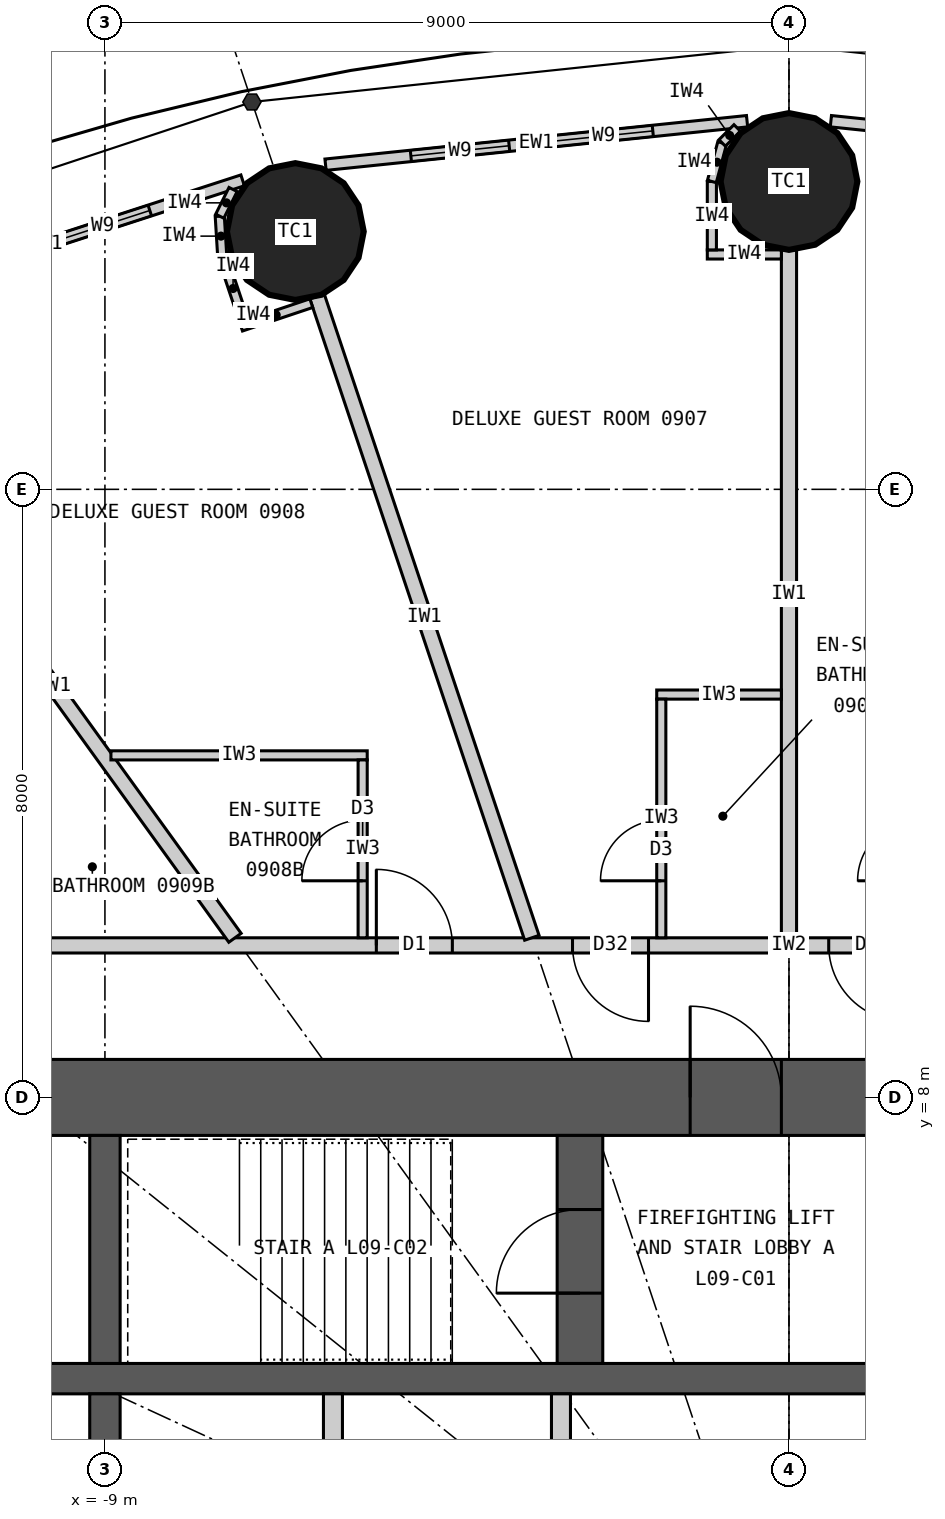
"""IFC4 building model, lengths in metres.
Left out: names, types, materials, properties, quantities, classifications, styles, units other than length and angle.
Written with IfcOpenShell. Run it as: python <this file> out.ifc"""

import sys

from ifc_helpers import new_model, si_unit, direction, frame, frame_2d, origin, origin_2d, place, context, subcontext, project, spatial, rectangle, circle, extrude, element, fill, save


model = new_model("IFC4")
c1 = context("Model", 3, precision=1e-05, world=origin(), true_north=direction((0.0, 1.0)))
c2 = subcontext(c1, "Body", "Model", "MODEL_VIEW")
j1 = project(units=[si_unit("LENGTHUNIT", "METRE"), si_unit("PLANEANGLEUNIT", "RADIAN")], contexts=[c1])
p1 = place(None, origin())
s1 = spatial("IfcSite", under=j1, at=p1, CompositionType="ELEMENT")
p2 = place(p1, origin())
s2 = spatial("IfcBuilding", under=s1, at=p2, CompositionType="ELEMENT")
p3 = place(p2, frame((0.0, 0.0, 42.6)))
s3 = spatial("IfcBuildingStorey", under=s2, at=p3, CompositionType="ELEMENT", Elevation=42.6)
for number, where, z_axis, x_axis in (
    (1, (0.0, 20.05, 0.0), (0.0, 0.0, 1.0), (1.0, 0.0, 0.0)),
    (2, (-6.495, 19.391, 0.0), (0.0, 0.0, 1.0), (1.0, 0.0, 0.0)),
):
    element("IfcColumn", number, at=place(p3, frame(where, z_axis=z_axis, x_axis=x_axis)), inside=s3, PredefinedType="COLUMN", context=c2, shape_type="SweptSolid", body=[
        extrude(circle(Radius=0.9, at=origin_2d()), origin(), (0.0, 0.0, 1.0), 3.3),
    ])
p4 = place(p3, frame((-12.5, 8.0, 0.0), z_axis=(0.0, 0.0, 1.0), x_axis=(1.0, 0.0, 0.0)))
e3 = element("IfcWall", 3, at=p4, inside=s3, PredefinedType="SHEAR", context=c2, shape_type="SweptSolid", body=[
    extrude(rectangle(XDim=25.0, YDim=1.0, at=frame_2d((12.5, 0.0))), origin(), (0.0, 0.0, 1.0), 3.3),
])
p5 = place(p4, frame((11.2, 0.0, 0.0)))
e4 = element("IfcOpeningElement", 4, at=p5, cuts=e3, PredefinedType="OPENING", context=c2, shape_type="SweptSolid", body=[
    extrude(rectangle(XDim=1.2, YDim=2.2, at=frame_2d((0.6, 1.1))), frame((0.0, 0.51, 0.0), z_axis=(0.0, -1.0, 0.0), x_axis=(1.0, 0.0, 0.0)), (0.0, 0.0, 1.0), 1.02),
])
p6 = place(p4, frame((18.8, 0.0, 0.0)))
e5 = element("IfcOpeningElement", 5, at=p6, cuts=e3, PredefinedType="OPENING", context=c2, shape_type="SweptSolid", body=[
    extrude(rectangle(XDim=0.9, YDim=2.2, at=frame_2d((0.45, 1.1))), frame((0.0, 0.51, 0.0), z_axis=(0.0, -1.0, 0.0), x_axis=(1.0, 0.0, 0.0)), (0.0, 0.0, 1.0), 1.02),
])
p7 = place(p3, frame((-11.5, 4.3, 0.0), z_axis=(0.0, 0.0, 1.0), x_axis=(1.0, 0.0, 0.0)))
e6 = element("IfcWall", 6, at=p7, inside=s3, PredefinedType="SHEAR", context=c2, shape_type="SweptSolid", body=[
    extrude(rectangle(XDim=23.0, YDim=0.4, at=frame_2d((11.5, 0.0))), origin(), (0.0, 0.0, 1.0), 3.3),
])
p8 = place(p3, frame((-9.0, 4.5, 0.0), z_axis=(0.0, 0.0, 1.0), x_axis=(0.0, 1.0, 0.0)))
e7 = element("IfcWall", 7, at=p8, inside=s3, PredefinedType="SHEAR", context=c2, shape_type="SweptSolid", body=[
    extrude(rectangle(XDim=3.0, YDim=0.4, at=frame_2d((1.5, 0.0))), origin(), (0.0, 0.0, 1.0), 3.3),
])
p9 = place(p3, frame((-9.0, 1.75, 0.0), z_axis=(0.0, 0.0, 1.0), x_axis=(0.0, 1.0, 0.0)))
e8 = element("IfcWall", 8, at=p9, inside=s3, PredefinedType="SHEAR", context=c2, shape_type="SweptSolid", body=[
    extrude(rectangle(XDim=2.35, YDim=0.4, at=frame_2d((1.175, 0.0))), origin(), (0.0, 0.0, 1.0), 3.3),
])
p10 = place(p3, frame((-2.75, 4.5, 0.0), z_axis=(0.0, 0.0, 1.0), x_axis=(0.0, 1.0, 0.0)))
e9 = element("IfcWall", 9, at=p10, inside=s3, PredefinedType="SHEAR", context=c2, shape_type="SweptSolid", body=[
    extrude(rectangle(XDim=3.0, YDim=0.6, at=frame_2d((1.5, 0.0))), origin(), (0.0, 0.0, 1.0), 3.3),
])
p11 = place(p10, frame((0.925, 0.0, 0.0)))
e10 = element("IfcOpeningElement", 10, at=p11, cuts=e9, PredefinedType="OPENING", context=c2, shape_type="SweptSolid", body=[
    extrude(rectangle(XDim=1.1, YDim=2.2, at=frame_2d((0.55, 1.1))), frame((0.0, 0.31, 0.0), z_axis=(0.0, -1.0, 0.0), x_axis=(1.0, 0.0, 0.0)), (0.0, 0.0, 1.0), 0.62),
])
for number, where, z_axis, x_axis in (
    (11, (-6.0, 1.75, 0.0), (0.0, 0.0, 1.0), (0.0, 1.0, 0.0)),
    (12, (-3.0, 1.75, 0.0), (0.0, 0.0, 1.0), (0.0, 1.0, 0.0)),
):
    element("IfcWall", number, at=place(p3, frame(where, z_axis=z_axis, x_axis=x_axis)), inside=s3, PredefinedType="PARTITIONING", context=c2, shape_type="SweptSolid", body=[
        extrude(rectangle(XDim=2.35, YDim=0.25, at=frame_2d((1.175, 0.0))), origin(), (0.0, 0.0, 1.0), 3.3),
    ])
p12 = place(p3, frame((6.098, 20.271, 0.0), z_axis=(0.0, 0.0, 1.0), x_axis=(-0.994723735084, 0.102589915983, 0.0)))
e13 = element("IfcWall", 13, at=p12, inside=s3, PredefinedType="ELEMENTEDWALL", context=c2, shape_type="SweptSolid", body=[
    extrude(rectangle(XDim=5.576, YDim=0.15, at=frame_2d((2.788, 0.0))), origin(), (0.0, 0.0, 1.0), 3.05),
])
p13 = place(p12, frame((1.129, 0.0, 0.9)))
e14 = element("IfcOpeningElement", 14, at=p13, cuts=e13, PredefinedType="OPENING", context=c2, shape_type="SweptSolid", body=[
    extrude(rectangle(XDim=1.3, YDim=1.9, at=frame_2d((0.65, 0.95))), frame((0.0, 0.085, 0.0), z_axis=(0.0, -1.0, 0.0), x_axis=(1.0, 0.0, 0.0)), (0.0, 0.0, 1.0), 0.17),
])
p14 = place(p12, frame((3.029, 0.0, 0.9)))
e15 = element("IfcOpeningElement", 15, at=p14, cuts=e13, PredefinedType="OPENING", context=c2, shape_type="SweptSolid", body=[
    extrude(rectangle(XDim=1.3, YDim=1.9, at=frame_2d((0.65, 0.95))), frame((0.0, 0.085, 0.0), z_axis=(0.0, -1.0, 0.0), x_axis=(1.0, 0.0, 0.0)), (0.0, 0.0, 1.0), 0.17),
])
p15 = place(p3, frame((-0.551, 20.843, 0.0), z_axis=(0.0, 0.0, 1.0), x_axis=(-0.994723735084, -0.102589915983, 0.0)))
e16 = element("IfcWall", 16, at=p15, inside=s3, PredefinedType="ELEMENTEDWALL", context=c2, shape_type="SweptSolid", body=[
    extrude(rectangle(XDim=5.576, YDim=0.15, at=frame_2d((2.788, 0.0))), origin(), (0.0, 0.0, 1.0), 3.05),
])
p16 = place(p15, frame((1.247, 0.0, 0.9)))
e17 = element("IfcOpeningElement", 17, at=p16, cuts=e16, PredefinedType="OPENING", context=c2, shape_type="SweptSolid", body=[
    extrude(rectangle(XDim=1.3, YDim=1.9, at=frame_2d((0.65, 0.95))), frame((0.0, 0.085, 0.0), z_axis=(0.0, -1.0, 0.0), x_axis=(1.0, 0.0, 0.0)), (0.0, 0.0, 1.0), 0.17),
])
p17 = place(p15, frame((3.147, 0.0, 0.9)))
e18 = element("IfcOpeningElement", 18, at=p17, cuts=e16, PredefinedType="OPENING", context=c2, shape_type="SweptSolid", body=[
    extrude(rectangle(XDim=1.3, YDim=1.9, at=frame_2d((0.65, 0.95))), frame((0.0, 0.085, 0.0), z_axis=(0.0, -1.0, 0.0), x_axis=(1.0, 0.0, 0.0)), (0.0, 0.0, 1.0), 0.17),
])
p18 = place(p3, frame((-7.188, 20.065, 0.0), z_axis=(0.0, 0.0, 1.0), x_axis=(-0.951138486029, -0.308764603532, 0.0)))
e19 = element("IfcWall", 19, at=p18, inside=s3, PredefinedType="ELEMENTEDWALL", context=c2, shape_type="SweptSolid", body=[
    extrude(rectangle(XDim=5.444, YDim=0.15, at=frame_2d((2.722, 0.0))), origin(), (0.0, 0.0, 1.0), 3.05),
])
p19 = place(p18, frame((1.284, 0.0, 0.9)))
e20 = element("IfcOpeningElement", 20, at=p19, cuts=e19, PredefinedType="OPENING", context=c2, shape_type="SweptSolid", body=[
    extrude(rectangle(XDim=1.3, YDim=1.9, at=frame_2d((0.65, 0.95))), frame((0.0, 0.085, 0.0), z_axis=(0.0, -1.0, 0.0), x_axis=(1.0, 0.0, 0.0)), (0.0, 0.0, 1.0), 0.17),
])
p20 = place(p18, frame((3.184, 0.0, 0.9)))
e21 = element("IfcOpeningElement", 21, at=p20, cuts=e19, PredefinedType="OPENING", context=c2, shape_type="SweptSolid", body=[
    extrude(rectangle(XDim=1.3, YDim=1.9, at=frame_2d((0.65, 0.95))), frame((0.0, 0.085, 0.0), z_axis=(0.0, -1.0, 0.0), x_axis=(1.0, 0.0, 0.0)), (0.0, 0.0, 1.0), 0.17),
])
p21 = place(p3, frame((-14.1, 10.0, 0.0), z_axis=(0.0, 0.0, 1.0), x_axis=(1.0, 0.0, 0.0)))
e22 = element("IfcWall", 22, at=p21, inside=s3, PredefinedType="PARTITIONING", context=c2, shape_type="SweptSolid", body=[
    extrude(rectangle(XDim=28.2, YDim=0.2, at=frame_2d((14.1, 0.0))), origin(), (0.0, 0.0, 1.0), 3.05),
])
p22 = place(p21, frame((23.477, 0.0, 0.0)))
e23 = element("IfcOpeningElement", 23, at=p22, cuts=e22, PredefinedType="OPENING", context=c2, shape_type="SweptSolid", body=[
    extrude(rectangle(XDim=1.0, YDim=2.2, at=frame_2d((0.5, 1.1))), frame((0.0, 0.11, 0.0), z_axis=(0.0, -1.0, 0.0), x_axis=(1.0, 0.0, 0.0)), (0.0, 0.0, 1.0), 0.22),
])
p23 = place(p21, frame((18.529, 0.0, 0.0)))
e24 = element("IfcOpeningElement", 24, at=p23, cuts=e22, PredefinedType="OPENING", context=c2, shape_type="SweptSolid", body=[
    extrude(rectangle(XDim=1.0, YDim=2.2, at=frame_2d((0.5, 1.1))), frame((0.0, 0.11, 0.0), z_axis=(0.0, -1.0, 0.0), x_axis=(1.0, 0.0, 0.0)), (0.0, 0.0, 1.0), 0.22),
])
p24 = place(p21, frame((14.623, 0.0, 0.0)))
e25 = element("IfcOpeningElement", 25, at=p24, cuts=e22, PredefinedType="OPENING", context=c2, shape_type="SweptSolid", body=[
    extrude(rectangle(XDim=1.0, YDim=2.2, at=frame_2d((0.5, 1.1))), frame((0.0, 0.11, 0.0), z_axis=(0.0, -1.0, 0.0), x_axis=(1.0, 0.0, 0.0)), (0.0, 0.0, 1.0), 0.22),
])
p25 = place(p21, frame((11.252, 0.0, 0.0)))
e26 = element("IfcOpeningElement", 26, at=p25, cuts=e22, PredefinedType="OPENING", context=c2, shape_type="SweptSolid", body=[
    extrude(rectangle(XDim=1.0, YDim=2.1, at=frame_2d((0.5, 1.05))), frame((0.0, 0.11, 0.0), z_axis=(0.0, -1.0, 0.0), x_axis=(1.0, 0.0, 0.0)), (0.0, 0.0, 1.0), 0.22),
])
p26 = place(p21, frame((8.671, 0.0, 0.0)))
e27 = element("IfcOpeningElement", 27, at=p26, cuts=e22, PredefinedType="OPENING", context=c2, shape_type="SweptSolid", body=[
    extrude(rectangle(XDim=1.0, YDim=2.2, at=frame_2d((0.5, 1.1))), frame((0.0, 0.11, 0.0), z_axis=(0.0, -1.0, 0.0), x_axis=(1.0, 0.0, 0.0)), (0.0, 0.0, 1.0), 0.22),
])
p27 = place(p21, frame((1.616, 0.0, 0.0)))
e28 = element("IfcOpeningElement", 28, at=p27, cuts=e22, PredefinedType="OPENING", context=c2, shape_type="SweptSolid", body=[
    extrude(rectangle(XDim=1.0, YDim=2.2, at=frame_2d((0.5, 1.1))), frame((0.0, 0.11, 0.0), z_axis=(0.0, -1.0, 0.0), x_axis=(1.0, 0.0, 0.0)), (0.0, 0.0, 1.0), 0.22),
])
p28 = place(p3, frame((0.0, 10.1, 0.0), z_axis=(0.0, 0.0, 1.0), x_axis=(0.0, 1.0, 0.0)))
e29 = element("IfcWall", 29, at=p28, inside=s3, PredefinedType="PARTITIONING", context=c2, shape_type="SweptSolid", body=[
    extrude(rectangle(XDim=9.05, YDim=0.2, at=frame_2d((4.525, 0.0))), origin(), (0.0, 0.0, 1.0), 2.15),
])
p29 = place(p3, frame((-3.383, 10.1, 0.0), z_axis=(0.0, 0.0, 1.0), x_axis=(-0.317593727596, 0.948226884344, 0.0)))
e30 = element("IfcWall", 30, at=p29, inside=s3, PredefinedType="PARTITIONING", context=c2, shape_type="SweptSolid", body=[
    extrude(rectangle(XDim=8.899, YDim=0.2, at=frame_2d((4.449, 0.0))), origin(), (0.0, 0.0, 1.0), 2.15),
])
p30 = place(p3, frame((-7.289, 10.1, 0.0), z_axis=(0.0, 0.0, 1.0), x_axis=(-0.585216319319, 0.810877216108, 0.0)))
e31 = element("IfcWall", 31, at=p30, inside=s3, PredefinedType="PARTITIONING", context=c2, shape_type="SweptSolid", body=[
    extrude(rectangle(XDim=8.16, YDim=0.2, at=frame_2d((4.08, 0.0))), origin(), (0.0, 0.0, 1.0), 2.15),
])
p31 = place(p3, frame((-0.1, 13.3, 0.0), z_axis=(0.0, 0.0, 1.0), x_axis=(-1.0, 0.0, 0.0)))
e32 = element("IfcWall", 32, at=p31, inside=s3, PredefinedType="PARTITIONING", context=c2, shape_type="SweptSolid", body=[
    extrude(rectangle(XDim=1.64, YDim=0.12, at=frame_2d((0.82, 0.0))), origin(), (0.0, 0.0, 1.0), 3.05),
])
p32 = place(p3, frame((-1.68, 10.1, 0.0), z_axis=(0.0, 0.0, 1.0), x_axis=(0.0, 1.0, 0.0)))
e33 = element("IfcWall", 33, at=p32, inside=s3, PredefinedType="PARTITIONING", context=c2, shape_type="SweptSolid", body=[
    extrude(rectangle(XDim=3.14, YDim=0.12, at=frame_2d((1.57, 0.0))), origin(), (0.0, 0.0, 1.0), 3.05),
])
p33 = place(p32, frame((0.75, 0.0, 0.0)))
e34 = element("IfcOpeningElement", 34, at=p33, cuts=e33, PredefinedType="OPENING", context=c2, shape_type="SweptSolid", body=[
    extrude(rectangle(XDim=0.8, YDim=2.1, at=frame_2d((0.4, 1.05))), frame((0.0, 0.07, 0.0), z_axis=(0.0, -1.0, 0.0), x_axis=(1.0, 0.0, 0.0)), (0.0, 0.0, 1.0), 0.14),
])
p34 = place(p3, frame((-8.921, 12.5, 0.0), z_axis=(0.0, 0.0, 1.0), x_axis=(1.0, 0.0, 0.0)))
e35 = element("IfcWall", 35, at=p34, inside=s3, PredefinedType="PARTITIONING", context=c2, shape_type="SweptSolid", body=[
    extrude(rectangle(XDim=3.372, YDim=0.12, at=frame_2d((1.686, 0.0))), origin(), (0.0, 0.0, 1.0), 3.05),
])
p35 = place(p3, frame((-5.609, 10.1, 0.0), z_axis=(0.0, 0.0, 1.0), x_axis=(0.0, 1.0, 0.0)))
e36 = element("IfcWall", 36, at=p35, inside=s3, PredefinedType="PARTITIONING", context=c2, shape_type="SweptSolid", body=[
    extrude(rectangle(XDim=2.34, YDim=0.12, at=frame_2d((1.17, 0.0))), origin(), (0.0, 0.0, 1.0), 3.05),
])
p36 = place(p35, frame((0.75, 0.0, 0.0)))
e37 = element("IfcOpeningElement", 37, at=p36, cuts=e36, PredefinedType="OPENING", context=c2, shape_type="SweptSolid", body=[
    extrude(rectangle(XDim=0.8, YDim=2.1, at=frame_2d((0.4, 1.05))), frame((0.0, 0.07, 0.0), z_axis=(0.0, -1.0, 0.0), x_axis=(1.0, 0.0, 0.0)), (0.0, 0.0, 1.0), 0.14),
])
p37 = place(p3, frame((-0.1, 19.09, 0.0), z_axis=(0.0, 0.0, 1.0), x_axis=(-1.0, 0.0, 0.0)))
e38 = element("IfcWall", 38, at=p37, inside=s3, PredefinedType="PARTITIONING", context=c2, shape_type="SweptSolid", body=[
    extrude(rectangle(XDim=0.974, YDim=0.12, at=frame_2d((0.487, 0.0))), origin(), (0.0, 0.0, 1.0), 3.05),
])
p38 = place(p3, frame((-1.015, 19.15, 0.0), z_axis=(0.0, 0.0, 1.0), x_axis=(0.0, 1.0, 0.0)))
e39 = element("IfcWall", 39, at=p38, inside=s3, PredefinedType="PARTITIONING", context=c2, shape_type="SweptSolid", body=[
    extrude(rectangle(XDim=0.9, YDim=0.12, at=frame_2d((0.45, 0.0))), origin(), (0.0, 0.0, 1.0), 3.05),
])
p39 = place(p3, frame((-1.015, 20.05, 0.0), z_axis=(0.0, 0.0, 1.0), x_axis=(0.258906465625, 0.96590239779, 0.0)))
e40 = element("IfcWall", 40, at=p39, inside=s3, PredefinedType="PARTITIONING", context=c2, shape_type="SweptSolid", body=[
    extrude(rectangle(XDim=0.525, YDim=0.12, at=frame_2d((0.263, 0.0))), origin(), (0.0, 0.0, 1.0), 3.05),
])
p40 = place(p3, frame((-0.879, 20.557, 0.0), z_axis=(0.0, 0.0, 1.0), x_axis=(0.707106781187, 0.707106781187, 0.0)))
e41 = element("IfcWall", 41, at=p40, inside=s3, PredefinedType="PARTITIONING", context=c2, shape_type="SweptSolid", body=[
    extrude(rectangle(XDim=0.279, YDim=0.12, at=frame_2d((0.14, 0.0))), origin(), (0.0, 0.0, 1.0), 3.05),
])
p41 = place(p3, frame((-6.285, 18.449, 0.0), z_axis=(0.0, 0.0, 1.0), x_axis=(-0.948281677008, -0.317430088446, 0.0)))
e42 = element("IfcWall", 42, at=p41, inside=s3, PredefinedType="PARTITIONING", context=c2, shape_type="SweptSolid", body=[
    extrude(rectangle(XDim=0.974, YDim=0.12, at=frame_2d((0.487, 0.0))), origin(), (0.0, 0.0, 1.0), 3.05),
])
p42 = place(p3, frame((-7.171, 18.216, 0.0), z_axis=(0.0, 0.0, 1.0), x_axis=(-0.317692409458, 0.94819382669, 0.0)))
e43 = element("IfcWall", 43, at=p42, inside=s3, PredefinedType="PARTITIONING", context=c2, shape_type="SweptSolid", body=[
    extrude(rectangle(XDim=0.9, YDim=0.12, at=frame_2d((0.45, 0.0))), origin(), (0.0, 0.0, 1.0), 3.05),
])
p43 = place(p3, frame((-7.457, 19.069, 0.0), z_axis=(0.0, 0.0, 1.0), x_axis=(-0.061365267648, 0.99811537606, 0.0)))
e44 = element("IfcWall", 44, at=p43, inside=s3, PredefinedType="PARTITIONING", context=c2, shape_type="SweptSolid", body=[
    extrude(rectangle(XDim=0.525, YDim=0.12, at=frame_2d((0.263, 0.0))), origin(), (0.0, 0.0, 1.0), 3.05),
])
p44 = place(p3, frame((-7.489, 19.593, 0.0), z_axis=(0.0, 0.0, 1.0), x_axis=(0.446218959337, 0.89492381817, 0.0)))
e45 = element("IfcWall", 45, at=p44, inside=s3, PredefinedType="PARTITIONING", context=c2, shape_type="SweptSolid", body=[
    extrude(rectangle(XDim=0.393, YDim=0.12, at=frame_2d((0.196, 0.0))), origin(), (0.0, 0.0, 1.0), 3.05),
])
p45 = place(p16, origin())
e46 = element("IfcWindow", 46, at=p45, inside=s3, PartitioningType="SINGLE_PANEL", PredefinedType="WINDOW", context=c2, shape_type="SweptSolid", body=[
    extrude(rectangle(XDim=1.3, YDim=1.9, at=frame_2d((0.65, 0.95))), frame((0.0, 0.03, 0.0), z_axis=(0.0, -1.0, 0.0), x_axis=(1.0, 0.0, 0.0)), (0.0, 0.0, 1.0), 0.06),
])
fill(e17, e46)
p46 = place(p17, origin())
e47 = element("IfcWindow", 47, at=p46, inside=s3, PartitioningType="SINGLE_PANEL", PredefinedType="WINDOW", context=c2, shape_type="SweptSolid", body=[
    extrude(rectangle(XDim=1.3, YDim=1.9, at=frame_2d((0.65, 0.95))), frame((0.0, 0.03, 0.0), z_axis=(0.0, -1.0, 0.0), x_axis=(1.0, 0.0, 0.0)), (0.0, 0.0, 1.0), 0.06),
])
fill(e18, e47)
p47 = place(p19, origin())
e48 = element("IfcWindow", 48, at=p47, inside=s3, PartitioningType="SINGLE_PANEL", PredefinedType="WINDOW", context=c2, shape_type="SweptSolid", body=[
    extrude(rectangle(XDim=1.3, YDim=1.9, at=frame_2d((0.65, 0.95))), frame((0.0, 0.03, 0.0), z_axis=(0.0, -1.0, 0.0), x_axis=(1.0, 0.0, 0.0)), (0.0, 0.0, 1.0), 0.06),
])
fill(e20, e48)
p48 = place(p24, origin())
e49 = element("IfcDoor", 49, at=p48, inside=s3, OperationType="SINGLE_SWING_RIGHT", PredefinedType="DOOR", context=c2, shape_type="SweptSolid", body=[
    extrude(rectangle(XDim=1.0, YDim=2.2, at=frame_2d((0.5, 1.1))), frame((0.0, 0.025, 0.0), z_axis=(0.0, -1.0, 0.0), x_axis=(1.0, 0.0, 0.0)), (0.0, 0.0, 1.0), 0.05),
])
fill(e25, e49)
p49 = place(p33, origin())
e50 = element("IfcDoor", 50, at=p49, inside=s3, OperationType="SINGLE_SWING_LEFT", PredefinedType="DOOR", context=c2, shape_type="SweptSolid", body=[
    extrude(rectangle(XDim=0.8, YDim=2.1, at=frame_2d((0.4, 1.05))), frame((0.0, 0.025, 0.0), z_axis=(0.0, -1.0, 0.0), x_axis=(1.0, 0.0, 0.0)), (0.0, 0.0, 1.0), 0.05),
])
fill(e34, e50)
p50 = place(p25, origin())
e51 = element("IfcDoor", 51, at=p50, inside=s3, OperationType="SINGLE_SWING_RIGHT", PredefinedType="DOOR", context=c2, shape_type="SweptSolid", body=[
    extrude(rectangle(XDim=1.0, YDim=2.1, at=frame_2d((0.5, 1.05))), frame((0.0, 0.025, 0.0), z_axis=(0.0, -1.0, 0.0), x_axis=(1.0, 0.0, 0.0)), (0.0, 0.0, 1.0), 0.05),
])
fill(e26, e51)
p51 = place(p36, origin())
e52 = element("IfcDoor", 52, at=p51, inside=s3, OperationType="SINGLE_SWING_LEFT", PredefinedType="DOOR", context=c2, shape_type="SweptSolid", body=[
    extrude(rectangle(XDim=0.8, YDim=2.1, at=frame_2d((0.4, 1.05))), frame((0.0, 0.025, 0.0), z_axis=(0.0, -1.0, 0.0), x_axis=(1.0, 0.0, 0.0)), (0.0, 0.0, 1.0), 0.05),
])
fill(e37, e52)
p52 = place(p26, origin())
e53 = element("IfcDoor", 53, at=p52, inside=s3, OperationType="SINGLE_SWING_LEFT", PredefinedType="DOOR", context=c2, shape_type="SweptSolid", body=[
    extrude(rectangle(XDim=1.0, YDim=2.2, at=frame_2d((0.5, 1.1))), frame((0.0, 0.025, 0.0), z_axis=(0.0, -1.0, 0.0), x_axis=(1.0, 0.0, 0.0)), (0.0, 0.0, 1.0), 0.05),
])
fill(e27, e53)
p53 = place(p5, origin())
e54 = element("IfcDoor", 54, at=p53, inside=s3, OperationType="SINGLE_SWING_LEFT", PredefinedType="DOOR", context=c2, shape_type="SweptSolid", body=[
    extrude(rectangle(XDim=1.2, YDim=2.2, at=frame_2d((0.6, 1.1))), frame((0.0, 0.025, 0.0), z_axis=(0.0, -1.0, 0.0), x_axis=(1.0, 0.0, 0.0)), (0.0, 0.0, 1.0), 0.05),
])
fill(e4, e54)
p54 = place(p11, origin())
e55 = element("IfcDoor", 55, at=p54, inside=s3, OperationType="SINGLE_SWING_LEFT", PredefinedType="DOOR", context=c2, shape_type="SweptSolid", body=[
    extrude(rectangle(XDim=1.1, YDim=2.2, at=frame_2d((0.55, 1.1))), frame((0.0, 0.025, 0.0), z_axis=(0.0, -1.0, 0.0), x_axis=(1.0, 0.0, 0.0)), (0.0, 0.0, 1.0), 0.05),
])
fill(e10, e55)
save(model, sys.argv[1])
